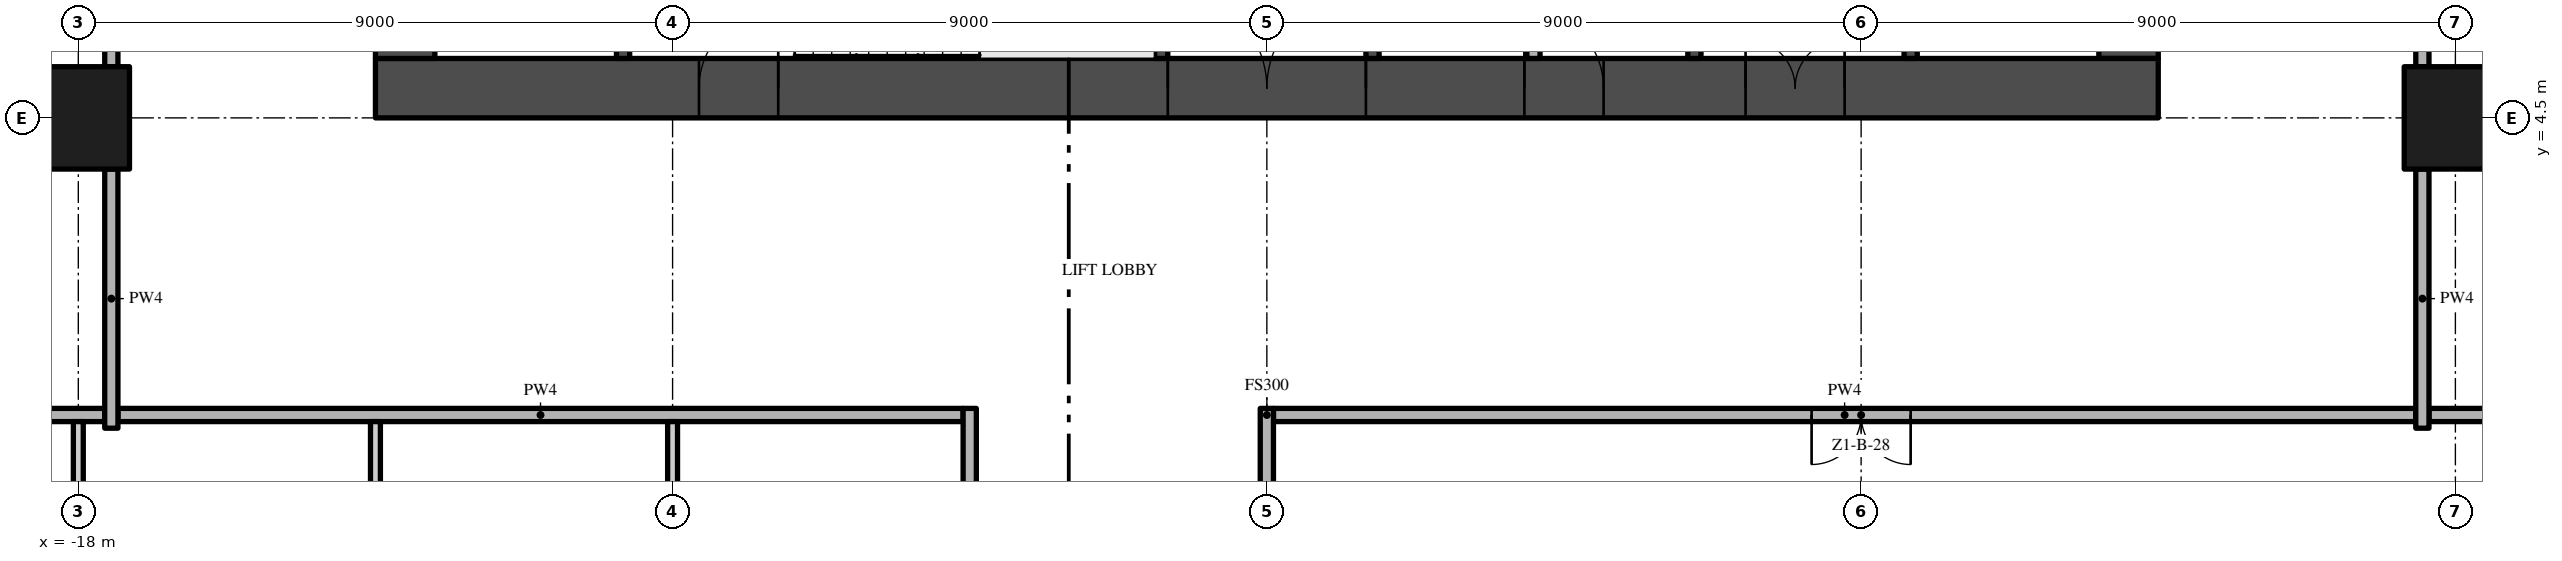
"""IFC4 building model, lengths in metres.
Left out: names, types, materials, properties, quantities, classifications, styles, units other than length and angle.
Written with IfcOpenShell. Run it as: python <this file> out.ifc"""

import sys

from ifc_helpers import new_model, si_unit, direction, frame, frame_2d, origin, origin_2d, place, context, subcontext, project, spatial, rectangle, extrude, element, fill, save


model = new_model("IFC4")
c1 = context("Model", 3, precision=1e-05, world=origin(), true_north=direction((0.0, 1.0)))
c2 = subcontext(c1, "Body", "Model", "MODEL_VIEW")
j1 = project(units=[si_unit("LENGTHUNIT", "METRE"), si_unit("PLANEANGLEUNIT", "RADIAN")], contexts=[c1])
p1 = place(None, origin())
s1 = spatial("IfcSite", under=j1, at=p1, CompositionType="ELEMENT")
p2 = place(p1, origin())
s2 = spatial("IfcBuilding", under=s1, at=p2, CompositionType="ELEMENT")
p3 = place(p2, frame((0.0, 0.0, 34.0)))
s3 = spatial("IfcBuildingStorey", under=s2, at=p3, CompositionType="ELEMENT", Elevation=34.0)
p4 = place(p3, frame((-13.5, 4.95, -0.3), z_axis=(0.0, 0.0, 1.0), x_axis=(1.0, 0.0, 0.0)))
e1 = element("IfcWall", 1, at=p4, inside=s3, PredefinedType="SHEAR", context=c2, shape_type="SweptSolid", body=[
    extrude(rectangle(XDim=27.0, YDim=0.9, at=frame_2d((13.5, 0.0))), origin(), (0.0, 0.0, 1.0), 3.8),
])
p5 = place(p4, frame((12.0, 0.0, 0.3)))
e2 = element("IfcOpeningElement", 2, at=p5, cuts=e1, PredefinedType="OPENING", context=c2, shape_type="SweptSolid", body=[
    extrude(rectangle(XDim=3.0, YDim=2.4, at=frame_2d((1.5, 1.2))), frame((0.0, 0.46, 0.0), z_axis=(0.0, -1.0, 0.0), x_axis=(1.0, 0.0, 0.0)), (0.0, 0.0, 1.0), 0.92),
])
p6 = place(p4, frame((4.9, 0.0, 0.3)))
e3 = element("IfcOpeningElement", 3, at=p6, cuts=e1, PredefinedType="OPENING", context=c2, shape_type="SweptSolid", body=[
    extrude(rectangle(XDim=1.2, YDim=2.2, at=frame_2d((0.6, 1.1))), frame((0.0, 0.46, 0.0), z_axis=(0.0, -1.0, 0.0), x_axis=(1.0, 0.0, 0.0)), (0.0, 0.0, 1.0), 0.92),
])
p7 = place(p4, frame((20.75, 0.0, 0.3)))
e4 = element("IfcOpeningElement", 4, at=p7, cuts=e1, PredefinedType="OPENING", context=c2, shape_type="SweptSolid", body=[
    extrude(rectangle(XDim=1.5, YDim=2.2, at=frame_2d((0.75, 1.1))), frame((0.0, 0.46, 0.0), z_axis=(0.0, -1.0, 0.0), x_axis=(1.0, 0.0, 0.0)), (0.0, 0.0, 1.0), 0.92),
])
p8 = place(p4, frame((17.4, 0.0, 0.3)))
e5 = element("IfcOpeningElement", 5, at=p8, cuts=e1, PredefinedType="OPENING", context=c2, shape_type="SweptSolid", body=[
    extrude(rectangle(XDim=1.2, YDim=2.2, at=frame_2d((0.6, 1.1))), frame((0.0, 0.46, 0.0), z_axis=(0.0, -1.0, 0.0), x_axis=(1.0, 0.0, 0.0)), (0.0, 0.0, 1.0), 0.92),
])
p9 = place(p3, frame((13.05, 5.4, -0.3), z_axis=(0.0, 0.0, 1.0), x_axis=(0.0, 1.0, 0.0)))
e6 = element("IfcWall", 6, at=p9, inside=s3, PredefinedType="SHEAR", context=c2, shape_type="SweptSolid", body=[
    extrude(rectangle(XDim=16.2, YDim=0.9, at=frame_2d((8.1, 0.0))), origin(), (0.0, 0.0, 1.0), 3.8),
])
p10 = place(p9, frame((6.0, 0.0, 0.3)))
e7 = element("IfcOpeningElement", 7, at=p10, cuts=e6, PredefinedType="OPENING", context=c2, shape_type="SweptSolid", body=[
    extrude(rectangle(XDim=1.2, YDim=2.2, at=frame_2d((0.6, 1.1))), frame((0.0, 0.46, 0.0), z_axis=(0.0, -1.0, 0.0), x_axis=(1.0, 0.0, 0.0)), (0.0, 0.0, 1.0), 0.92),
])
p11 = place(p3, frame((-13.05, 21.6, -0.3), z_axis=(0.0, 0.0, 1.0), x_axis=(0.0, -1.0, 0.0)))
e8 = element("IfcWall", 8, at=p11, inside=s3, PredefinedType="SHEAR", context=c2, shape_type="SweptSolid", body=[
    extrude(rectangle(XDim=16.2, YDim=0.9, at=frame_2d((8.1, 0.0))), origin(), (0.0, 0.0, 1.0), 3.8),
])
p12 = place(p11, frame((9.0, 0.0, 0.3)))
e9 = element("IfcOpeningElement", 9, at=p12, cuts=e8, PredefinedType="OPENING", context=c2, shape_type="SweptSolid", body=[
    extrude(rectangle(XDim=1.2, YDim=2.2, at=frame_2d((0.6, 1.1))), frame((0.0, 0.46, 0.0), z_axis=(0.0, -1.0, 0.0), x_axis=(1.0, 0.0, 0.0)), (0.0, 0.0, 1.0), 0.92),
])
for number, where, z_axis, x_axis in (
    (10, (-18.0, 4.5, 0.0), (0.0, 0.0, 1.0), (1.0, 0.0, 0.0)),
    (11, (18.0, 4.5, 0.0), (0.0, 0.0, 1.0), (1.0, 0.0, 0.0)),
):
    element("IfcColumn", number, at=place(p3, frame(where, z_axis=z_axis, x_axis=x_axis)), inside=s3, PredefinedType="COLUMN", context=c2, shape_type="SweptSolid", body=[
        extrude(rectangle(XDim=1.55, YDim=1.55, at=origin_2d()), origin(), (0.0, 0.0, 1.0), 3.5),
    ])
for number, where, z_axis, x_axis in (
    (12, (-9.75, 5.4, 0.0), (0.0, 0.0, 1.0), (0.0, 1.0, 0.0)),
    (13, (-1.6, 5.4, 0.0), (0.0, 0.0, 1.0), (0.0, 1.0, 0.0)),
):
    element("IfcWall", number, at=place(p3, frame(where, z_axis=z_axis, x_axis=x_axis)), inside=s3, PredefinedType="SHEAR", context=c2, shape_type="SweptSolid", body=[
        extrude(rectangle(XDim=2.55, YDim=0.2, at=frame_2d((1.275, 0.0))), origin(), (0.0, 0.0, 1.0), 3.5),
    ])
p13 = place(p3, frame((1.6, 9.8, 0.0), z_axis=(0.0, 0.0, 1.0), x_axis=(0.0, -1.0, 0.0)))
e14 = element("IfcWall", 14, at=p13, inside=s3, PredefinedType="SHEAR", context=c2, shape_type="SweptSolid", body=[
    extrude(rectangle(XDim=4.4, YDim=0.2, at=frame_2d((2.2, 0.0))), origin(), (0.0, 0.0, 1.0), 3.5),
])
p14 = place(p13, frame((1.35, 0.0, 0.0)))
e15 = element("IfcOpeningElement", 15, at=p14, cuts=e14, PredefinedType="OPENING", context=c2, shape_type="SweptSolid", body=[
    extrude(rectangle(XDim=0.9, YDim=2.1, at=frame_2d((0.45, 1.05))), frame((0.0, 0.11, 0.0), z_axis=(0.0, -1.0, 0.0), x_axis=(1.0, 0.0, 0.0)), (0.0, 0.0, 1.0), 0.22),
])
p15 = place(p3, frame((4.037, 9.8, 0.0), z_axis=(0.0, 0.0, 1.0), x_axis=(0.0, -1.0, 0.0)))
e16 = element("IfcWall", 16, at=p15, inside=s3, PredefinedType="PARTITIONING", context=c2, shape_type="SweptSolid", body=[
    extrude(rectangle(XDim=4.4, YDim=0.2, at=frame_2d((2.2, 0.0))), origin(), (0.0, 0.0, 1.0), 3.5),
])
p16 = place(p15, frame((1.75, 0.0, 0.0)))
e17 = element("IfcOpeningElement", 17, at=p16, cuts=e16, PredefinedType="OPENING", context=c2, shape_type="SweptSolid", body=[
    extrude(rectangle(XDim=0.9, YDim=2.1, at=frame_2d((0.45, 1.05))), frame((0.0, 0.11, 0.0), z_axis=(0.0, -1.0, 0.0), x_axis=(1.0, 0.0, 0.0)), (0.0, 0.0, 1.0), 0.22),
])
p17 = place(p3, frame((6.475, 5.4, 0.0), z_axis=(0.0, 0.0, 1.0), x_axis=(0.0, 1.0, 0.0)))
e18 = element("IfcWall", 18, at=p17, inside=s3, PredefinedType="SHEAR", context=c2, shape_type="SweptSolid", body=[
    extrude(rectangle(XDim=4.4, YDim=0.2, at=frame_2d((2.2, 0.0))), origin(), (0.0, 0.0, 1.0), 3.5),
])
p18 = place(p3, frame((9.75, 5.4, 0.0), z_axis=(0.0, 0.0, 1.0), x_axis=(0.0, 1.0, 0.0)))
e19 = element("IfcWall", 19, at=p18, inside=s3, PredefinedType="SHEAR", context=c2, shape_type="SweptSolid", body=[
    extrude(rectangle(XDim=2.2, YDim=0.2, at=frame_2d((1.1, 0.0))), origin(), (0.0, 0.0, 1.0), 3.5),
])
p19 = place(p18, frame((0.55, 0.0, 0.0)))
e20 = element("IfcOpeningElement", 20, at=p19, cuts=e19, PredefinedType="OPENING", context=c2, shape_type="SweptSolid", body=[
    extrude(rectangle(XDim=1.1, YDim=2.1, at=frame_2d((0.55, 1.05))), frame((0.0, 0.11, 0.0), z_axis=(0.0, -1.0, 0.0), x_axis=(1.0, 0.0, 0.0)), (0.0, 0.0, 1.0), 0.22),
])
p20 = place(p3, frame((-17.4, 0.0, 0.0), z_axis=(0.0, 0.0, 1.0), x_axis=(1.0, 0.0, 0.0)))
e21 = element("IfcWall", 21, at=p20, inside=s3, PredefinedType="PARTITIONING", context=c2, shape_type="SweptSolid", body=[
    extrude(rectangle(XDim=12.8, YDim=0.2, at=frame_2d((6.4, 0.0))), origin(), (0.0, 0.0, 1.0), 3.5),
])
p21 = place(p3, frame((17.4, 0.0, 0.0), z_axis=(0.0, 0.0, 1.0), x_axis=(-1.0, 0.0, 0.0)))
e22 = element("IfcWall", 22, at=p21, inside=s3, PredefinedType="PARTITIONING", context=c2, shape_type="SweptSolid", body=[
    extrude(rectangle(XDim=17.3, YDim=0.2, at=frame_2d((8.65, 0.0))), origin(), (0.0, 0.0, 1.0), 3.5),
])
p22 = place(p21, frame((7.65, 0.0, 0.0)))
e23 = element("IfcOpeningElement", 23, at=p22, cuts=e22, PredefinedType="OPENING", context=c2, shape_type="SweptSolid", body=[
    extrude(rectangle(XDim=1.5, YDim=2.4, at=frame_2d((0.75, 1.2))), frame((0.0, 0.11, 0.0), z_axis=(0.0, -1.0, 0.0), x_axis=(1.0, 0.0, 0.0)), (0.0, 0.0, 1.0), 0.22),
])
for number, where, z_axis, x_axis in (
    (24, (-26.7, 0.0, 0.0), (0.0, 0.0, 1.0), (1.0, 0.0, 0.0)),
    (25, (17.6, 0.0, 0.0), (0.0, 0.0, 1.0), (1.0, 0.0, 0.0)),
):
    element("IfcWall", number, at=place(p3, frame(where, z_axis=z_axis, x_axis=x_axis)), inside=s3, PredefinedType="PARTITIONING", context=c2, shape_type="SweptSolid", body=[
        extrude(rectangle(XDim=9.1, YDim=0.2, at=frame_2d((4.55, 0.0))), origin(), (0.0, 0.0, 1.0), 3.5),
    ])
p23 = place(p3, frame((-18.0, -3.725, 0.0), z_axis=(0.0, 0.0, 1.0), x_axis=(0.0, 1.0, 0.0)))
e26 = element("IfcWall", 26, at=p23, inside=s3, PredefinedType="PARTITIONING", context=c2, shape_type="SweptSolid", body=[
    extrude(rectangle(XDim=3.625, YDim=0.15, at=frame_2d((1.812, 0.0))), origin(), (0.0, 0.0, 1.0), 3.5),
])
p24 = place(p23, frame((0.75, 0.0, 0.0)))
e27 = element("IfcOpeningElement", 27, at=p24, cuts=e26, PredefinedType="OPENING", context=c2, shape_type="SweptSolid", body=[
    extrude(rectangle(XDim=1.5, YDim=2.4, at=frame_2d((0.75, 1.2))), frame((0.0, 0.085, 0.0), z_axis=(0.0, -1.0, 0.0), x_axis=(1.0, 0.0, 0.0)), (0.0, 0.0, 1.0), 0.17),
])
p25 = place(p3, frame((-17.5, -0.2, 0.0), z_axis=(0.0, 0.0, 1.0), x_axis=(0.0, 1.0, 0.0)))
e28 = element("IfcWall", 28, at=p25, inside=s3, PredefinedType="PARTITIONING", context=c2, shape_type="SweptSolid", body=[
    extrude(rectangle(XDim=3.925, YDim=0.2, at=frame_2d((1.962, 0.0))), origin(), (0.0, 0.0, 1.0), 3.5),
])
p26 = place(p3, frame((-17.5, 5.275, 0.0), z_axis=(0.0, 0.0, 1.0), x_axis=(0.0, 1.0, 0.0)))
e29 = element("IfcWall", 29, at=p26, inside=s3, PredefinedType="PARTITIONING", context=c2, shape_type="SweptSolid", body=[
    extrude(rectangle(XDim=7.45, YDim=0.2, at=frame_2d((3.725, 0.0))), origin(), (0.0, 0.0, 1.0), 3.5),
])
p27 = place(p26, frame((3.125, 0.0, 0.0)))
e30 = element("IfcOpeningElement", 30, at=p27, cuts=e29, PredefinedType="OPENING", context=c2, shape_type="SweptSolid", body=[
    extrude(rectangle(XDim=1.2, YDim=2.4, at=frame_2d((0.6, 1.2))), frame((0.0, 0.11, 0.0), z_axis=(0.0, -1.0, 0.0), x_axis=(1.0, 0.0, 0.0)), (0.0, 0.0, 1.0), 0.22),
])
p28 = place(p3, frame((-13.5, -0.1, 0.0), z_axis=(0.0, 0.0, 1.0), x_axis=(0.0, -1.0, 0.0)))
e31 = element("IfcWall", 31, at=p28, inside=s3, PredefinedType="PARTITIONING", context=c2, shape_type="SweptSolid", body=[
    extrude(rectangle(XDim=8.525, YDim=0.15, at=frame_2d((4.263, 0.0))), origin(), (0.0, 0.0, 1.0), 3.5),
])
p29 = place(p28, frame((4.0, 0.0, 0.0)))
e32 = element("IfcOpeningElement", 32, at=p29, cuts=e31, PredefinedType="OPENING", context=c2, shape_type="SweptSolid", body=[
    extrude(rectangle(XDim=0.8, YDim=2.0, at=frame_2d((0.4, 1.0))), frame((0.0, 0.085, 0.0), z_axis=(0.0, -1.0, 0.0), x_axis=(1.0, 0.0, 0.0)), (0.0, 0.0, 1.0), 0.17),
])
p30 = place(p3, frame((-9.0, -3.725, 0.0), z_axis=(0.0, 0.0, 1.0), x_axis=(0.0, 1.0, 0.0)))
e33 = element("IfcWall", 33, at=p30, inside=s3, PredefinedType="PARTITIONING", context=c2, shape_type="SweptSolid", body=[
    extrude(rectangle(XDim=3.625, YDim=0.15, at=frame_2d((1.812, 0.0))), origin(), (0.0, 0.0, 1.0), 3.5),
])
p31 = place(p30, frame((1.775, 0.0, 0.0)))
e34 = element("IfcOpeningElement", 34, at=p31, cuts=e33, PredefinedType="OPENING", context=c2, shape_type="SweptSolid", body=[
    extrude(rectangle(XDim=0.9, YDim=2.1, at=frame_2d((0.45, 1.05))), frame((0.0, 0.085, 0.0), z_axis=(0.0, -1.0, 0.0), x_axis=(1.0, 0.0, 0.0)), (0.0, 0.0, 1.0), 0.17),
])
p32 = place(p3, frame((-4.5, -22.2, 0.0), z_axis=(0.0, 0.0, 1.0), x_axis=(0.0, 1.0, 0.0)))
e35 = element("IfcWall", 35, at=p32, inside=s3, PredefinedType="PARTITIONING", context=c2, shape_type="SweptSolid", body=[
    extrude(rectangle(XDim=22.3, YDim=0.2, at=frame_2d((11.15, 0.0))), origin(), (0.0, 0.0, 1.0), 3.5),
])
p33 = place(p32, frame((10.2, 0.0, 0.0)))
e36 = element("IfcOpeningElement", 36, at=p33, cuts=e35, PredefinedType="OPENING", context=c2, shape_type="SweptSolid", body=[
    extrude(rectangle(XDim=1.5, YDim=2.4, at=frame_2d((0.75, 1.2))), frame((0.0, 0.11, 0.0), z_axis=(0.0, -1.0, 0.0), x_axis=(1.0, 0.0, 0.0)), (0.0, 0.0, 1.0), 0.22),
])
p34 = place(p3, frame((0.0, -3.725, 0.0), z_axis=(0.0, 0.0, 1.0), x_axis=(0.0, 1.0, 0.0)))
e37 = element("IfcWall", 37, at=p34, inside=s3, PredefinedType="PARTITIONING", context=c2, shape_type="SweptSolid", body=[
    extrude(rectangle(XDim=3.825, YDim=0.2, at=frame_2d((1.913, 0.0))), origin(), (0.0, 0.0, 1.0), 3.5),
])
p35 = place(p3, frame((17.5, -0.2, 0.0), z_axis=(0.0, 0.0, 1.0), x_axis=(0.0, 1.0, 0.0)))
e38 = element("IfcWall", 38, at=p35, inside=s3, PredefinedType="PARTITIONING", context=c2, shape_type="SweptSolid", body=[
    extrude(rectangle(XDim=3.925, YDim=0.2, at=frame_2d((1.962, 0.0))), origin(), (0.0, 0.0, 1.0), 3.5),
])
p36 = place(p3, frame((17.5, 5.275, 0.0), z_axis=(0.0, 0.0, 1.0), x_axis=(0.0, 1.0, 0.0)))
e39 = element("IfcWall", 39, at=p36, inside=s3, PredefinedType="PARTITIONING", context=c2, shape_type="SweptSolid", body=[
    extrude(rectangle(XDim=7.45, YDim=0.2, at=frame_2d((3.725, 0.0))), origin(), (0.0, 0.0, 1.0), 3.5),
])
p37 = place(p5, frame((3.0, 0.0, 0.0), z_axis=(0.0, 0.0, 1.0), x_axis=(-1.0, 0.0, 0.0)))
e40 = element("IfcDoor", 40, at=p37, inside=s3, OperationType="DOUBLE_DOOR_SINGLE_SWING", PredefinedType="DOOR", context=c2, shape_type="SweptSolid", body=[
    extrude(rectangle(XDim=3.0, YDim=2.4, at=frame_2d((1.5, 1.2))), frame((0.0, 0.025, 0.0), z_axis=(0.0, -1.0, 0.0), x_axis=(1.0, 0.0, 0.0)), (0.0, 0.0, 1.0), 0.05),
])
fill(e2, e40)
p38 = place(p6, frame((1.2, 0.0, 0.0), z_axis=(0.0, 0.0, 1.0), x_axis=(-1.0, 0.0, 0.0)))
e41 = element("IfcDoor", 41, at=p38, inside=s3, OperationType="SINGLE_SWING_LEFT", PredefinedType="DOOR", context=c2, shape_type="SweptSolid", body=[
    extrude(rectangle(XDim=1.2, YDim=2.2, at=frame_2d((0.6, 1.1))), frame((0.0, 0.025, 0.0), z_axis=(0.0, -1.0, 0.0), x_axis=(1.0, 0.0, 0.0)), (0.0, 0.0, 1.0), 0.05),
])
fill(e3, e41)
p39 = place(p7, frame((1.5, 0.0, 0.0), z_axis=(0.0, 0.0, 1.0), x_axis=(-1.0, 0.0, 0.0)))
e42 = element("IfcDoor", 42, at=p39, inside=s3, OperationType="DOUBLE_DOOR_SINGLE_SWING", PredefinedType="DOOR", context=c2, shape_type="SweptSolid", body=[
    extrude(rectangle(XDim=1.5, YDim=2.2, at=frame_2d((0.75, 1.1))), frame((0.0, 0.025, 0.0), z_axis=(0.0, -1.0, 0.0), x_axis=(1.0, 0.0, 0.0)), (0.0, 0.0, 1.0), 0.05),
])
fill(e4, e42)
p40 = place(p8, frame((1.2, 0.0, 0.0), z_axis=(0.0, 0.0, 1.0), x_axis=(-1.0, 0.0, 0.0)))
e43 = element("IfcDoor", 43, at=p40, inside=s3, OperationType="SINGLE_SWING_RIGHT", PredefinedType="DOOR", context=c2, shape_type="SweptSolid", body=[
    extrude(rectangle(XDim=1.2, YDim=2.2, at=frame_2d((0.6, 1.1))), frame((0.0, 0.025, 0.0), z_axis=(0.0, -1.0, 0.0), x_axis=(1.0, 0.0, 0.0)), (0.0, 0.0, 1.0), 0.05),
])
fill(e5, e43)
p41 = place(p22, origin())
e44 = element("IfcDoor", 44, at=p41, inside=s3, OperationType="DOUBLE_DOOR_SINGLE_SWING", PredefinedType="DOOR", context=c2, shape_type="SweptSolid", body=[
    extrude(rectangle(XDim=1.5, YDim=2.4, at=frame_2d((0.75, 1.2))), frame((0.0, 0.025, 0.0), z_axis=(0.0, -1.0, 0.0), x_axis=(1.0, 0.0, 0.0)), (0.0, 0.0, 1.0), 0.05),
])
fill(e23, e44)
save(model, sys.argv[1])
